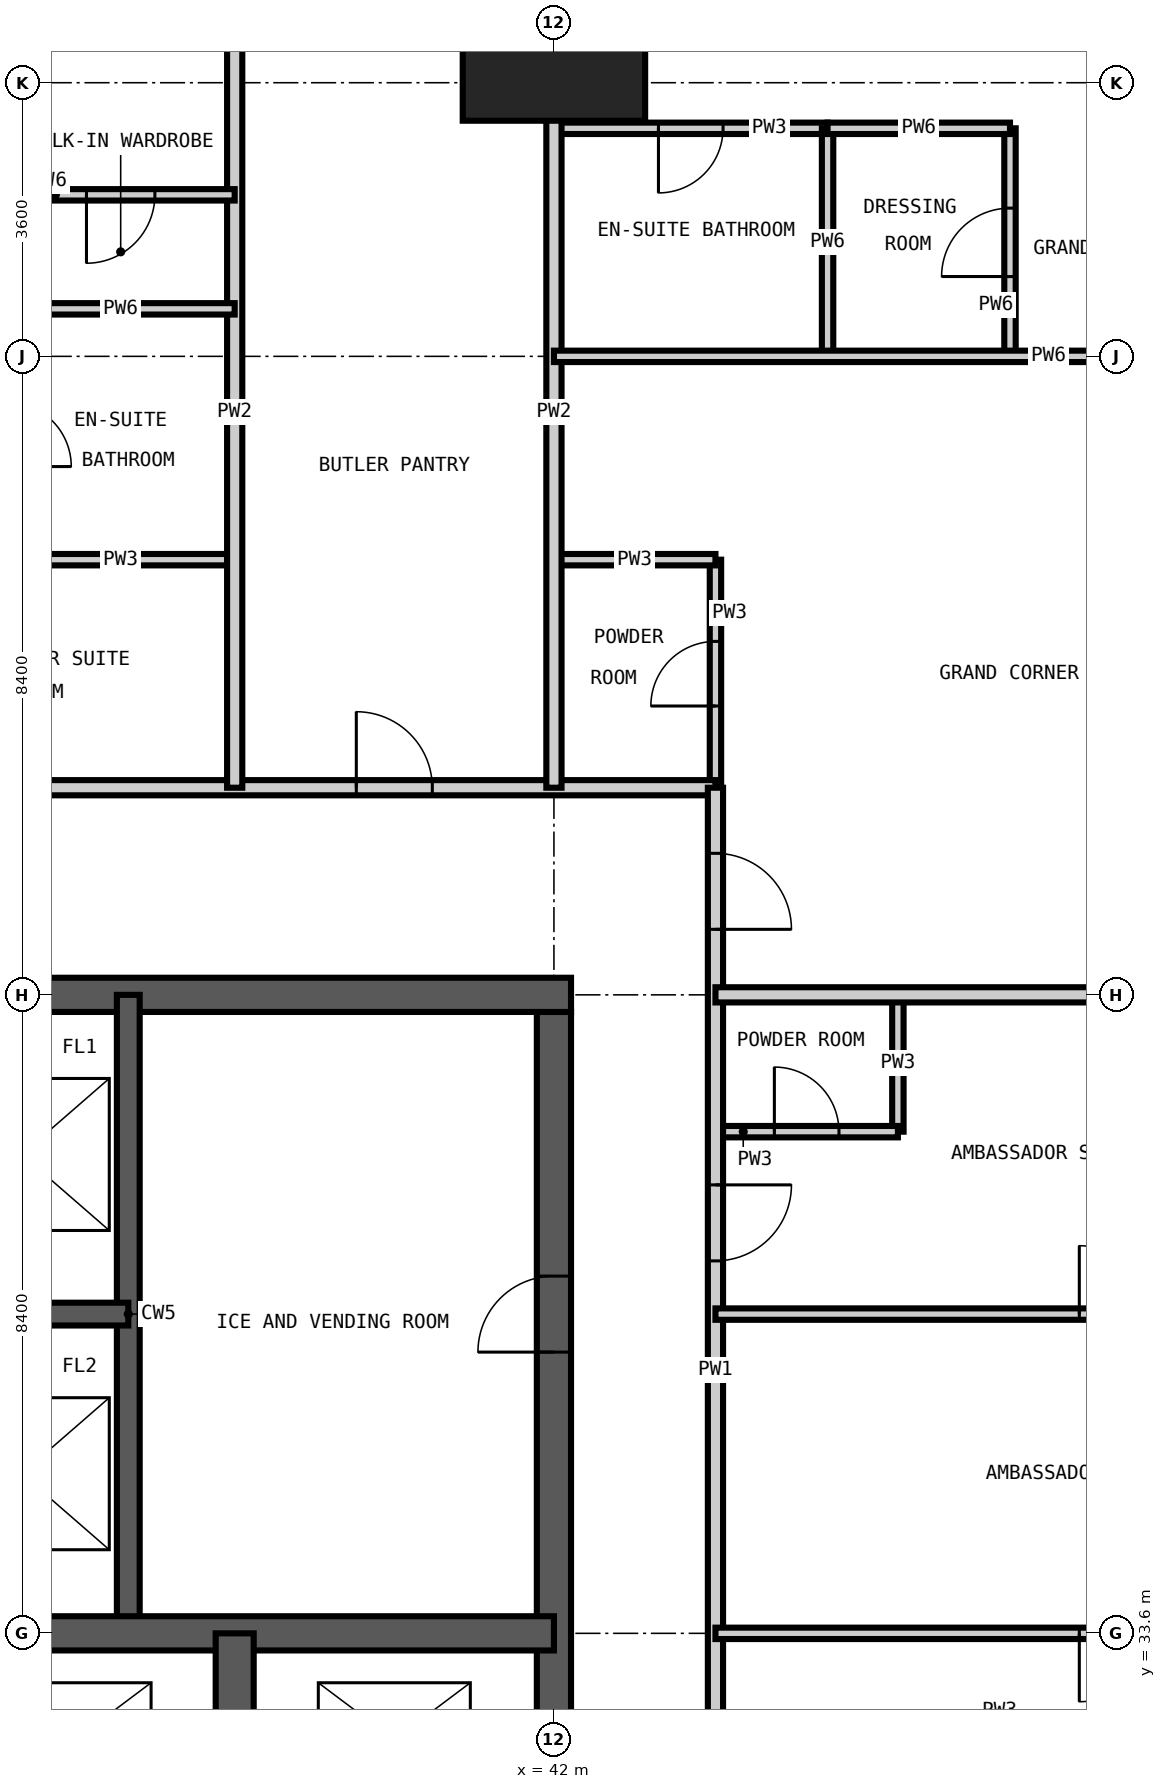
"""IFC4 building model, lengths in metres.
Left out: names, types, materials, properties, quantities, classifications, styles, units other than length and angle.
Written with IfcOpenShell. Run it as: python <this file> out.ifc"""

import sys

from ifc_helpers import new_model, si_unit, direction, frame, frame_2d, origin, origin_2d, place, context, subcontext, project, spatial, rectangle, extrude, element, fill, save


model = new_model("IFC4")
c1 = context("Model", 3, precision=1e-05, world=origin(), true_north=direction((0.0, 1.0)))
c2 = subcontext(c1, "Body", "Model", "MODEL_VIEW")
j1 = project(units=[si_unit("LENGTHUNIT", "METRE"), si_unit("PLANEANGLEUNIT", "RADIAN")], contexts=[c1])
p1 = place(None, origin())
s1 = spatial("IfcSite", under=j1, at=p1, CompositionType="ELEMENT")
p2 = place(p1, origin())
s2 = spatial("IfcBuilding", under=s1, at=p2, CompositionType="ELEMENT")
p3 = place(p2, frame((0.0, 0.0, 241.2)))
s3 = spatial("IfcBuildingStorey", under=s2, at=p3, CompositionType="ELEMENT", Elevation=241.2)
p4 = place(p3, frame((42.0, 54.0, -0.35), z_axis=(0.0, 0.0, 1.0), x_axis=(1.0, 0.0, 0.0)))
e1 = element("IfcColumn", 1, at=p4, inside=s3, PredefinedType="COLUMN", context=c2, shape_type="SweptSolid", body=[
    extrude(rectangle(XDim=2.4, YDim=1.0, at=origin_2d()), origin(), (0.0, 0.0, 1.0), 3.9),
])
p5 = place(p3, frame((42.0, 17.025, -0.35), z_axis=(0.0, 0.0, 1.0), x_axis=(0.0, 1.0, 0.0)))
e2 = element("IfcWall", 2, at=p5, inside=s3, PredefinedType="SHEAR", context=c2, shape_type="SweptSolid", body=[
    extrude(rectangle(XDim=24.75, YDim=0.45, at=frame_2d((12.375, 0.0))), origin(), (0.0, 0.0, 1.0), 3.9),
])
p6 = place(p5, frame((0.575, 0.0, 0.35)))
e3 = element("IfcOpeningElement", 3, at=p6, cuts=e2, PredefinedType="OPENING", context=c2, shape_type="SweptSolid", body=[
    extrude(rectangle(XDim=1.2, YDim=2.2, at=frame_2d((0.6, 1.1))), frame((0.0, 0.235, 0.0), z_axis=(0.0, -1.0, 0.0), x_axis=(1.0, 0.0, 0.0)), (0.0, 0.0, 1.0), 0.47),
])
p7 = place(p5, frame((11.475, 0.0, 0.35)))
e4 = element("IfcOpeningElement", 4, at=p7, cuts=e2, PredefinedType="OPENING", context=c2, shape_type="SweptSolid", body=[
    extrude(rectangle(XDim=1.8, YDim=2.2, at=frame_2d((0.9, 1.1))), frame((0.0, 0.235, 0.0), z_axis=(0.0, -1.0, 0.0), x_axis=(1.0, 0.0, 0.0)), (0.0, 0.0, 1.0), 0.47),
])
p8 = place(p5, frame((20.275, 0.0, 0.35)))
e5 = element("IfcOpeningElement", 5, at=p8, cuts=e2, PredefinedType="OPENING", context=c2, shape_type="SweptSolid", body=[
    extrude(rectangle(XDim=1.0, YDim=2.1, at=frame_2d((0.5, 1.05))), frame((0.0, 0.235, 0.0), z_axis=(0.0, -1.0, 0.0), x_axis=(1.0, 0.0, 0.0)), (0.0, 0.0, 1.0), 0.47),
])
p9 = place(p3, frame((42.225, 42.0, -0.35), z_axis=(0.0, 0.0, 1.0), x_axis=(-1.0, 0.0, 0.0)))
e6 = element("IfcWall", 6, at=p9, inside=s3, PredefinedType="SHEAR", context=c2, shape_type="SweptSolid", body=[
    extrude(rectangle(XDim=17.25, YDim=0.45, at=frame_2d((8.625, 0.0))), origin(), (0.0, 0.0, 1.0), 3.9),
])
p10 = place(p9, frame((10.125, 0.0, 0.35)))
e7 = element("IfcOpeningElement", 7, at=p10, cuts=e6, PredefinedType="OPENING", context=c2, shape_type="SweptSolid", body=[
    extrude(rectangle(XDim=1.2, YDim=2.2, at=frame_2d((0.6, 1.1))), frame((0.0, 0.235, 0.0), z_axis=(0.0, -1.0, 0.0), x_axis=(1.0, 0.0, 0.0)), (0.0, 0.0, 1.0), 0.47),
])
p11 = place(p3, frame((36.4, 33.6, -0.35), z_axis=(0.0, 0.0, 1.0), x_axis=(0.0, 1.0, 0.0)))
e8 = element("IfcWall", 8, at=p11, inside=s3, PredefinedType="SHEAR", context=c2, shape_type="SweptSolid", body=[
    extrude(rectangle(XDim=8.4, YDim=0.3, at=frame_2d((4.2, 0.0))), origin(), (0.0, 0.0, 1.0), 3.9),
])
p12 = place(p3, frame((33.6, 37.8, -0.35), z_axis=(0.0, 0.0, 1.0), x_axis=(1.0, 0.0, 0.0)))
e9 = element("IfcWall", 9, at=p12, inside=s3, PredefinedType="SHEAR", context=c2, shape_type="SweptSolid", body=[
    extrude(rectangle(XDim=2.8, YDim=0.3, at=frame_2d((1.4, 0.0))), origin(), (0.0, 0.0, 1.0), 3.9),
])
p13 = place(p3, frame((25.2, 33.6, -0.35), z_axis=(0.0, 0.0, 1.0), x_axis=(1.0, 0.0, 0.0)))
e10 = element("IfcWall", 10, at=p13, inside=s3, PredefinedType="SHEAR", context=c2, shape_type="SweptSolid", body=[
    extrude(rectangle(XDim=16.8, YDim=0.45, at=frame_2d((8.4, 0.0))), origin(), (0.0, 0.0, 1.0), 3.9),
])
p14 = place(p3, frame((37.8, 30.8, -0.35), z_axis=(0.0, 0.0, 1.0), x_axis=(0.0, 1.0, 0.0)))
e11 = element("IfcWall", 11, at=p14, inside=s3, PredefinedType="SHEAR", context=c2, shape_type="SweptSolid", body=[
    extrude(rectangle(XDim=2.8, YDim=0.5, at=frame_2d((1.4, 0.0))), origin(), (0.0, 0.0, 1.0), 3.9),
])
p15 = place(p3, frame((44.125, 44.725, 0.0), z_axis=(0.0, 0.0, 1.0), x_axis=(0.0, 1.0, 0.0)))
e12 = element("IfcWall", 12, at=p15, inside=s3, PredefinedType="PARTITIONING", context=c2, shape_type="SweptSolid", body=[
    extrude(rectangle(XDim=3.0, YDim=0.15, at=frame_2d((1.5, 0.0))), origin(), (0.0, 0.0, 1.0), 3.55),
])
p16 = place(p15, frame((1.075, 0.0, 0.0)))
e13 = element("IfcOpeningElement", 13, at=p16, cuts=e12, PredefinedType="OPENING", context=c2, shape_type="SweptSolid", body=[
    extrude(rectangle(XDim=0.85, YDim=2.1, at=frame_2d((0.425, 1.05))), frame((0.0, 0.085, 0.0), z_axis=(0.0, -1.0, 0.0), x_axis=(1.0, 0.0, 0.0)), (0.0, 0.0, 1.0), 0.17),
])
p17 = place(p3, frame((46.525, 40.2, 0.0), z_axis=(0.0, 0.0, 1.0), x_axis=(0.0, 1.0, 0.0)))
e14 = element("IfcWall", 14, at=p17, inside=s3, PredefinedType="PARTITIONING", context=c2, shape_type="SweptSolid", body=[
    extrude(rectangle(XDim=1.8, YDim=0.15, at=frame_2d((0.9, 0.0))), origin(), (0.0, 0.0, 1.0), 3.55),
])
p18 = place(p3, frame((44.125, 40.2, 0.0), z_axis=(0.0, 0.0, 1.0), x_axis=(1.0, 0.0, 0.0)))
e15 = element("IfcWall", 15, at=p18, inside=s3, PredefinedType="PARTITIONING", context=c2, shape_type="SweptSolid", body=[
    extrude(rectangle(XDim=2.4, YDim=0.15, at=frame_2d((1.2, 0.0))), origin(), (0.0, 0.0, 1.0), 3.55),
])
p19 = place(p18, frame((0.775, 0.0, 0.0)))
e16 = element("IfcOpeningElement", 16, at=p19, cuts=e15, PredefinedType="OPENING", context=c2, shape_type="SweptSolid", body=[
    extrude(rectangle(XDim=0.85, YDim=2.1, at=frame_2d((0.425, 1.05))), frame((0.0, 0.085, 0.0), z_axis=(0.0, -1.0, 0.0), x_axis=(1.0, 0.0, 0.0)), (0.0, 0.0, 1.0), 0.17),
])
p20 = place(p3, frame((34.8, 47.725, 0.0), z_axis=(0.0, 0.0, 1.0), x_axis=(1.0, 0.0, 0.0)))
e17 = element("IfcWall", 17, at=p20, inside=s3, PredefinedType="PARTITIONING", context=c2, shape_type="SweptSolid", body=[
    extrude(rectangle(XDim=3.0, YDim=0.15, at=frame_2d((1.5, 0.0))), origin(), (0.0, 0.0, 1.0), 3.55),
])
p21 = place(p3, frame((42.0, 47.725, 0.0), z_axis=(0.0, 0.0, 1.0), x_axis=(1.0, 0.0, 0.0)))
e18 = element("IfcWall", 18, at=p21, inside=s3, PredefinedType="PARTITIONING", context=c2, shape_type="SweptSolid", body=[
    extrude(rectangle(XDim=2.125, YDim=0.15, at=frame_2d((1.062, 0.0))), origin(), (0.0, 0.0, 1.0), 3.55),
])
p22 = place(p3, frame((42.0, 53.4, 0.0), z_axis=(0.0, 0.0, 1.0), x_axis=(1.0, 0.0, 0.0)))
e19 = element("IfcWall", 19, at=p22, inside=s3, PredefinedType="PARTITIONING", context=c2, shape_type="SweptSolid", body=[
    extrude(rectangle(XDim=3.6, YDim=0.15, at=frame_2d((1.8, 0.0))), origin(), (0.0, 0.0, 1.0), 3.55),
])
p23 = place(p22, frame((1.375, 0.0, 0.0)))
e20 = element("IfcOpeningElement", 20, at=p23, cuts=e19, PredefinedType="OPENING", context=c2, shape_type="SweptSolid", body=[
    extrude(rectangle(XDim=0.85, YDim=2.1, at=frame_2d((0.425, 1.05))), frame((0.0, 0.085, 0.0), z_axis=(0.0, -1.0, 0.0), x_axis=(1.0, 0.0, 0.0)), (0.0, 0.0, 1.0), 0.17),
])
p24 = place(p3, frame((21.875, 44.725, 0.0), z_axis=(0.0, 0.0, 1.0), x_axis=(1.0, 0.0, 0.0)))
e21 = element("IfcWall", 21, at=p24, inside=s3, PredefinedType="PARTITIONING", context=c2, shape_type="SweptSolid", body=[
    extrude(rectangle(XDim=22.25, YDim=0.2, at=frame_2d((11.125, 0.0))), origin(), (0.0, 0.0, 1.0), 3.55),
])
p25 = place(p24, frame((5.825, 0.0, 0.0)))
e22 = element("IfcOpeningElement", 22, at=p25, cuts=e21, PredefinedType="OPENING", context=c2, shape_type="SweptSolid", body=[
    extrude(rectangle(XDim=1.0, YDim=2.2, at=frame_2d((0.5, 1.1))), frame((0.0, 0.11, 0.0), z_axis=(0.0, -1.0, 0.0), x_axis=(1.0, 0.0, 0.0)), (0.0, 0.0, 1.0), 0.22),
])
p26 = place(p24, frame((17.525, 0.0, 0.0)))
e23 = element("IfcOpeningElement", 23, at=p26, cuts=e21, PredefinedType="OPENING", context=c2, shape_type="SweptSolid", body=[
    extrude(rectangle(XDim=1.0, YDim=2.1, at=frame_2d((0.5, 1.05))), frame((0.0, 0.11, 0.0), z_axis=(0.0, -1.0, 0.0), x_axis=(1.0, 0.0, 0.0)), (0.0, 0.0, 1.0), 0.22),
])
p27 = place(p3, frame((44.125, 44.725, 0.0), z_axis=(0.0, 0.0, 1.0), x_axis=(0.0, -1.0, 0.0)))
e24 = element("IfcWall", 24, at=p27, inside=s3, PredefinedType="PARTITIONING", context=c2, shape_type="SweptSolid", body=[
    extrude(rectangle(XDim=15.325, YDim=0.2, at=frame_2d((7.663, 0.0))), origin(), (0.0, 0.0, 1.0), 3.55),
])
p28 = place(p27, frame((5.225, 0.0, 0.0)))
e25 = element("IfcOpeningElement", 25, at=p28, cuts=e24, PredefinedType="OPENING", context=c2, shape_type="SweptSolid", body=[
    extrude(rectangle(XDim=1.0, YDim=2.2, at=frame_2d((0.5, 1.1))), frame((0.0, 0.11, 0.0), z_axis=(0.0, -1.0, 0.0), x_axis=(1.0, 0.0, 0.0)), (0.0, 0.0, 1.0), 0.22),
])
p29 = place(p27, frame((0.863, 0.0, 0.0)))
e26 = element("IfcOpeningElement", 26, at=p29, cuts=e24, PredefinedType="OPENING", context=c2, shape_type="SweptSolid", body=[
    extrude(rectangle(XDim=1.0, YDim=2.2, at=frame_2d((0.5, 1.1))), frame((0.0, 0.11, 0.0), z_axis=(0.0, -1.0, 0.0), x_axis=(1.0, 0.0, 0.0)), (0.0, 0.0, 1.0), 0.22),
])
for number, where, z_axis, x_axis in (
    (27, (37.8, 44.725, 0.0), (0.0, 0.0, 1.0), (0.0, 1.0, 0.0)),
    (28, (42.0, 44.725, 0.0), (0.0, 0.0, 1.0), (0.0, 1.0, 0.0)),
):
    element("IfcWall", number, at=place(p3, frame(where, z_axis=z_axis, x_axis=x_axis)), inside=s3, PredefinedType="PARTITIONING", context=c2, shape_type="SweptSolid", body=[
        extrude(rectangle(XDim=9.893, YDim=0.2, at=frame_2d((4.946, 0.0))), origin(), (0.0, 0.0, 1.0), 3.55),
    ])
p30 = place(p3, frame((44.125, 42.0, 0.0), z_axis=(0.0, 0.0, 1.0), x_axis=(1.0, 0.0, 0.0)))
e29 = element("IfcWall", 29, at=p30, inside=s3, PredefinedType="PARTITIONING", context=c2, shape_type="SweptSolid", body=[
    extrude(rectangle(XDim=10.493, YDim=0.2, at=frame_2d((5.247, 0.0))), origin(), (0.0, 0.0, 1.0), 3.55),
])
p31 = place(p3, frame((45.6, 50.4, 0.0), z_axis=(0.0, 0.0, 1.0), x_axis=(0.0, 1.0, 0.0)))
e30 = element("IfcWall", 30, at=p31, inside=s3, PredefinedType="PARTITIONING", context=c2, shape_type="SweptSolid", body=[
    extrude(rectangle(XDim=3.0, YDim=0.15, at=frame_2d((1.5, 0.0))), origin(), (0.0, 0.0, 1.0), 3.55),
])
p32 = place(p3, frame((48.0, 50.4, 0.0), z_axis=(0.0, 0.0, 1.0), x_axis=(0.0, 1.0, 0.0)))
e31 = element("IfcWall", 31, at=p32, inside=s3, PredefinedType="PARTITIONING", context=c2, shape_type="SweptSolid", body=[
    extrude(rectangle(XDim=3.0, YDim=0.15, at=frame_2d((1.5, 0.0))), origin(), (0.0, 0.0, 1.0), 3.55),
])
p33 = place(p32, frame((1.05, 0.0, 0.0)))
e32 = element("IfcOpeningElement", 32, at=p33, cuts=e31, PredefinedType="OPENING", context=c2, shape_type="SweptSolid", body=[
    extrude(rectangle(XDim=0.9, YDim=2.1, at=frame_2d((0.45, 1.05))), frame((0.0, 0.085, 0.0), z_axis=(0.0, -1.0, 0.0), x_axis=(1.0, 0.0, 0.0)), (0.0, 0.0, 1.0), 0.17),
])
p34 = place(p3, frame((44.125, 33.6, 0.0), z_axis=(0.0, 0.0, 1.0), x_axis=(1.0, 0.0, 0.0)))
e33 = element("IfcWall", 33, at=p34, inside=s3, PredefinedType="PARTITIONING", context=c2, shape_type="SweptSolid", body=[
    extrude(rectangle(XDim=10.493, YDim=0.15, at=frame_2d((5.247, 0.0))), origin(), (0.0, 0.0, 1.0), 3.55),
])
p35 = place(p34, frame((4.787, 0.0, 0.0)))
e34 = element("IfcOpeningElement", 34, at=p35, cuts=e33, PredefinedType="OPENING", context=c2, shape_type="SweptSolid", body=[
    extrude(rectangle(XDim=0.9, YDim=2.1, at=frame_2d((0.45, 1.05))), frame((0.0, 0.085, 0.0), z_axis=(0.0, -1.0, 0.0), x_axis=(1.0, 0.0, 0.0)), (0.0, 0.0, 1.0), 0.17),
])
p36 = place(p3, frame((44.125, 37.8, 0.0), z_axis=(0.0, 0.0, 1.0), x_axis=(1.0, 0.0, 0.0)))
e35 = element("IfcWall", 35, at=p36, inside=s3, PredefinedType="PARTITIONING", context=c2, shape_type="SweptSolid", body=[
    extrude(rectangle(XDim=10.493, YDim=0.15, at=frame_2d((5.247, 0.0))), origin(), (0.0, 0.0, 1.0), 3.55),
])
p37 = place(p36, frame((4.787, 0.0, 0.0)))
e36 = element("IfcOpeningElement", 36, at=p37, cuts=e35, PredefinedType="OPENING", context=c2, shape_type="SweptSolid", body=[
    extrude(rectangle(XDim=0.9, YDim=2.1, at=frame_2d((0.45, 1.05))), frame((0.0, 0.085, 0.0), z_axis=(0.0, -1.0, 0.0), x_axis=(1.0, 0.0, 0.0)), (0.0, 0.0, 1.0), 0.17),
])
p38 = place(p3, frame((42.0, 50.4, 0.0), z_axis=(0.0, 0.0, 1.0), x_axis=(1.0, 0.0, 0.0)))
e37 = element("IfcWall", 37, at=p38, inside=s3, PredefinedType="PARTITIONING", context=c2, shape_type="SweptSolid", body=[
    extrude(rectangle(XDim=12.618, YDim=0.15, at=frame_2d((6.309, 0.0))), origin(), (0.0, 0.0, 1.0), 3.55),
])
p39 = place(p38, frame((8.85, 0.0, 0.0)))
e38 = element("IfcOpeningElement", 38, at=p39, cuts=e37, PredefinedType="OPENING", context=c2, shape_type="SweptSolid", body=[
    extrude(rectangle(XDim=0.9, YDim=2.1, at=frame_2d((0.45, 1.05))), frame((0.0, 0.085, 0.0), z_axis=(0.0, -1.0, 0.0), x_axis=(1.0, 0.0, 0.0)), (0.0, 0.0, 1.0), 0.17),
])
p40 = place(p3, frame((34.8, 51.025, 0.0), z_axis=(0.0, 0.0, 1.0), x_axis=(1.0, 0.0, 0.0)))
e39 = element("IfcWall", 39, at=p40, inside=s3, PredefinedType="PARTITIONING", context=c2, shape_type="SweptSolid", body=[
    extrude(rectangle(XDim=3.0, YDim=0.15, at=frame_2d((1.5, 0.0))), origin(), (0.0, 0.0, 1.0), 3.55),
])
p41 = place(p3, frame((34.8, 52.525, 0.0), z_axis=(0.0, 0.0, 1.0), x_axis=(1.0, 0.0, 0.0)))
e40 = element("IfcWall", 40, at=p41, inside=s3, PredefinedType="PARTITIONING", context=c2, shape_type="SweptSolid", body=[
    extrude(rectangle(XDim=3.0, YDim=0.15, at=frame_2d((1.5, 0.0))), origin(), (0.0, 0.0, 1.0), 3.55),
])
p42 = place(p41, frame((1.05, 0.0, 0.0)))
e41 = element("IfcOpeningElement", 41, at=p42, cuts=e40, PredefinedType="OPENING", context=c2, shape_type="SweptSolid", body=[
    extrude(rectangle(XDim=0.9, YDim=2.1, at=frame_2d((0.45, 1.05))), frame((0.0, 0.085, 0.0), z_axis=(0.0, -1.0, 0.0), x_axis=(1.0, 0.0, 0.0)), (0.0, 0.0, 1.0), 0.17),
])
p43 = place(p3, frame((45.6, 53.4, 0.0), z_axis=(0.0, 0.0, 1.0), x_axis=(1.0, 0.0, 0.0)))
e42 = element("IfcWall", 42, at=p43, inside=s3, PredefinedType="PARTITIONING", context=c2, shape_type="SweptSolid", body=[
    extrude(rectangle(XDim=2.4, YDim=0.15, at=frame_2d((1.2, 0.0))), origin(), (0.0, 0.0, 1.0), 3.55),
])
p44 = place(p28, origin())
e43 = element("IfcDoor", 43, at=p44, inside=s3, OperationType="SINGLE_SWING_LEFT", PredefinedType="DOOR", context=c2, shape_type="SweptSolid", body=[
    extrude(rectangle(XDim=1.0, YDim=2.2, at=frame_2d((0.5, 1.1))), frame((0.0, 0.025, 0.0), z_axis=(0.0, -1.0, 0.0), x_axis=(1.0, 0.0, 0.0)), (0.0, 0.0, 1.0), 0.05),
])
fill(e25, e43)
p45 = place(p19, origin())
e44 = element("IfcDoor", 44, at=p45, inside=s3, OperationType="SINGLE_SWING_LEFT", PredefinedType="DOOR", context=c2, shape_type="SweptSolid", body=[
    extrude(rectangle(XDim=0.85, YDim=2.1, at=frame_2d((0.425, 1.05))), frame((0.0, 0.025, 0.0), z_axis=(0.0, -1.0, 0.0), x_axis=(1.0, 0.0, 0.0)), (0.0, 0.0, 1.0), 0.05),
])
fill(e16, e44)
p46 = place(p37, origin())
e45 = element("IfcDoor", 45, at=p46, inside=s3, OperationType="SINGLE_SWING_LEFT", PredefinedType="DOOR", context=c2, shape_type="SweptSolid", body=[
    extrude(rectangle(XDim=0.9, YDim=2.1, at=frame_2d((0.45, 1.05))), frame((0.0, 0.025, 0.0), z_axis=(0.0, -1.0, 0.0), x_axis=(1.0, 0.0, 0.0)), (0.0, 0.0, 1.0), 0.05),
])
fill(e36, e45)
p47 = place(p35, frame((0.9, 0.0, 0.0), z_axis=(0.0, 0.0, 1.0), x_axis=(-1.0, 0.0, 0.0)))
e46 = element("IfcDoor", 46, at=p47, inside=s3, OperationType="SINGLE_SWING_RIGHT", PredefinedType="DOOR", context=c2, shape_type="SweptSolid", body=[
    extrude(rectangle(XDim=0.9, YDim=2.1, at=frame_2d((0.45, 1.05))), frame((0.0, 0.025, 0.0), z_axis=(0.0, -1.0, 0.0), x_axis=(1.0, 0.0, 0.0)), (0.0, 0.0, 1.0), 0.05),
])
fill(e34, e46)
p48 = place(p42, frame((0.9, 0.0, 0.0), z_axis=(0.0, 0.0, 1.0), x_axis=(-1.0, 0.0, 0.0)))
e47 = element("IfcDoor", 47, at=p48, inside=s3, OperationType="SINGLE_SWING_RIGHT", PredefinedType="DOOR", context=c2, shape_type="SweptSolid", body=[
    extrude(rectangle(XDim=0.9, YDim=2.1, at=frame_2d((0.45, 1.05))), frame((0.0, 0.025, 0.0), z_axis=(0.0, -1.0, 0.0), x_axis=(1.0, 0.0, 0.0)), (0.0, 0.0, 1.0), 0.05),
])
fill(e41, e47)
p49 = place(p26, origin())
e48 = element("IfcDoor", 48, at=p49, inside=s3, OperationType="SINGLE_SWING_LEFT", PredefinedType="DOOR", context=c2, shape_type="SweptSolid", body=[
    extrude(rectangle(XDim=1.0, YDim=2.1, at=frame_2d((0.5, 1.05))), frame((0.0, 0.025, 0.0), z_axis=(0.0, -1.0, 0.0), x_axis=(1.0, 0.0, 0.0)), (0.0, 0.0, 1.0), 0.05),
])
fill(e23, e48)
p50 = place(p29, origin())
e49 = element("IfcDoor", 49, at=p50, inside=s3, OperationType="SINGLE_SWING_RIGHT", PredefinedType="DOOR", context=c2, shape_type="SweptSolid", body=[
    extrude(rectangle(XDim=1.0, YDim=2.2, at=frame_2d((0.5, 1.1))), frame((0.0, 0.025, 0.0), z_axis=(0.0, -1.0, 0.0), x_axis=(1.0, 0.0, 0.0)), (0.0, 0.0, 1.0), 0.05),
])
fill(e26, e49)
p51 = place(p16, origin())
e50 = element("IfcDoor", 50, at=p51, inside=s3, OperationType="SINGLE_SWING_LEFT", PredefinedType="DOOR", context=c2, shape_type="SweptSolid", body=[
    extrude(rectangle(XDim=0.85, YDim=2.1, at=frame_2d((0.425, 1.05))), frame((0.0, 0.025, 0.0), z_axis=(0.0, -1.0, 0.0), x_axis=(1.0, 0.0, 0.0)), (0.0, 0.0, 1.0), 0.05),
])
fill(e13, e50)
p52 = place(p23, frame((0.85, 0.0, 0.0), z_axis=(0.0, 0.0, 1.0), x_axis=(-1.0, 0.0, 0.0)))
e51 = element("IfcDoor", 51, at=p52, inside=s3, OperationType="SINGLE_SWING_RIGHT", PredefinedType="DOOR", context=c2, shape_type="SweptSolid", body=[
    extrude(rectangle(XDim=0.85, YDim=2.1, at=frame_2d((0.425, 1.05))), frame((0.0, 0.025, 0.0), z_axis=(0.0, -1.0, 0.0), x_axis=(1.0, 0.0, 0.0)), (0.0, 0.0, 1.0), 0.05),
])
fill(e20, e51)
p53 = place(p33, origin())
e52 = element("IfcDoor", 52, at=p53, inside=s3, OperationType="SINGLE_SWING_LEFT", PredefinedType="DOOR", context=c2, shape_type="SweptSolid", body=[
    extrude(rectangle(XDim=0.9, YDim=2.1, at=frame_2d((0.45, 1.05))), frame((0.0, 0.025, 0.0), z_axis=(0.0, -1.0, 0.0), x_axis=(1.0, 0.0, 0.0)), (0.0, 0.0, 1.0), 0.05),
])
fill(e32, e52)
p54 = place(p8, origin())
e53 = element("IfcDoor", 53, at=p54, inside=s3, OperationType="SINGLE_SWING_LEFT", PredefinedType="DOOR", context=c2, shape_type="SweptSolid", body=[
    extrude(rectangle(XDim=1.0, YDim=2.1, at=frame_2d((0.5, 1.05))), frame((0.0, 0.025, 0.0), z_axis=(0.0, -1.0, 0.0), x_axis=(1.0, 0.0, 0.0)), (0.0, 0.0, 1.0), 0.05),
])
fill(e5, e53)
save(model, sys.argv[1])
